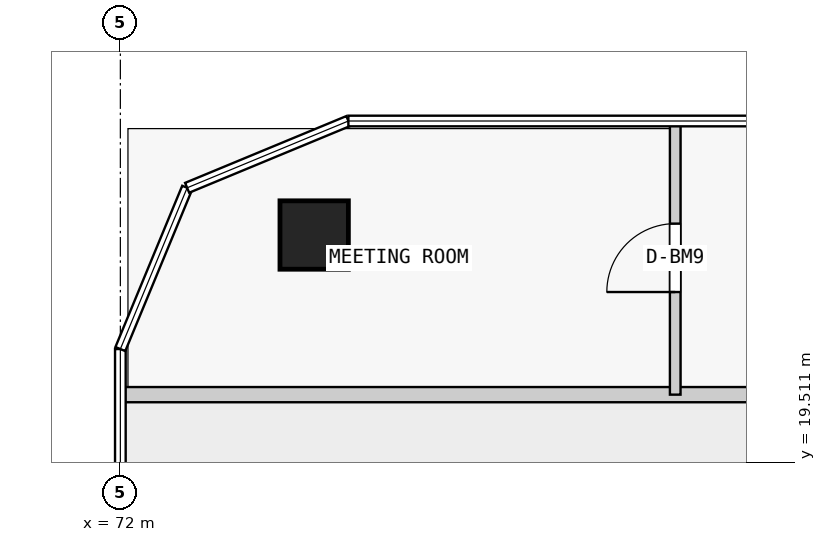
"""IFC4 building model, lengths in metres.
Left out: names, types, materials, properties, quantities, classifications, styles, units other than length and angle.
Written with IfcOpenShell. Run it as: python <this file> out.ifc"""

import sys

from ifc_helpers import new_model, si_unit, direction, frame, frame_2d, origin, origin_2d, place, context, subcontext, project, spatial, rectangle, extrude, element, fill, save


model = new_model("IFC4")
c1 = context("Model", 3, precision=1e-05, world=origin(), true_north=direction((0.0, 1.0)))
c2 = subcontext(c1, "Body", "Model", "MODEL_VIEW")
j1 = project(units=[si_unit("LENGTHUNIT", "METRE"), si_unit("PLANEANGLEUNIT", "RADIAN")], contexts=[c1])
p1 = place(None, origin())
s1 = spatial("IfcSite", under=j1, at=p1, CompositionType="ELEMENT")
p2 = place(p1, origin())
s2 = spatial("IfcBuilding", under=s1, at=p2, CompositionType="ELEMENT")
p3 = place(p2, frame((0.0, 0.0, 113.3)))
s3 = spatial("IfcBuildingStorey", under=s2, at=p3, CompositionType="ELEMENT", Elevation=113.3)
p4 = place(p3, frame((74.55, 22.5, 0.0), z_axis=(0.0, 0.0, 1.0), x_axis=(1.0, 0.0, 0.0)))
e1 = element("IfcColumn", 1, at=p4, inside=s3, PredefinedType="COLUMN", context=c2, shape_type="SweptSolid", body=[
    extrude(rectangle(XDim=0.9, YDim=0.9, at=origin_2d()), origin(), (0.0, 0.0, 1.0), 3.5),
])
p5 = place(p3, frame((72.0, 20.4, 0.0), z_axis=(0.0, 0.0, 1.0), x_axis=(1.0, 0.0, 0.0)))
e2 = element("IfcWall", 2, at=p5, inside=s3, PredefinedType="PARTITIONING", context=c2, shape_type="SweptSolid", body=[
    extrude(rectangle(XDim=20.0, YDim=0.2, at=frame_2d((10.0, 0.0))), origin(), (0.0, 0.0, 1.0), 3.25),
])
p6 = place(p5, frame((11.5, 0.0, 0.0)))
e3 = element("IfcOpeningElement", 3, at=p6, cuts=e2, PredefinedType="OPENING", context=c2, shape_type="SweptSolid", body=[
    extrude(rectangle(XDim=1.0, YDim=2.4, at=frame_2d((0.5, 1.2))), frame((0.0, 0.11, 0.0), z_axis=(0.0, -1.0, 0.0), x_axis=(1.0, 0.0, 0.0)), (0.0, 0.0, 1.0), 0.22),
])
p7 = place(p3, frame((79.3, 20.4, 0.0), z_axis=(0.0, 0.0, 1.0), x_axis=(0.0, 1.0, 0.0)))
e4 = element("IfcWall", 4, at=p7, inside=s3, PredefinedType="PARTITIONING", context=c2, shape_type="SweptSolid", body=[
    extrude(rectangle(XDim=3.6, YDim=0.14, at=frame_2d((1.8, 0.0))), origin(), (0.0, 0.0, 1.0), 3.25),
])
p8 = place(p7, frame((1.35, 0.0, 0.0)))
e5 = element("IfcOpeningElement", 5, at=p8, cuts=e4, PredefinedType="OPENING", context=c2, shape_type="SweptSolid", body=[
    extrude(rectangle(XDim=0.9, YDim=2.4, at=frame_2d((0.45, 1.2))), frame((0.0, 0.08, 0.0), z_axis=(0.0, -1.0, 0.0), x_axis=(1.0, 0.0, 0.0)), (0.0, 0.0, 1.0), 0.16),
])
p9 = place(p8, origin())
e6 = element("IfcDoor", 6, at=p9, inside=s3, OperationType="SINGLE_SWING_LEFT", PredefinedType="DOOR", context=c2, shape_type="SweptSolid", body=[
    extrude(rectangle(XDim=0.9, YDim=2.4, at=frame_2d((0.45, 1.2))), frame((0.0, 0.025, 0.0), z_axis=(0.0, -1.0, 0.0), x_axis=(1.0, 0.0, 0.0)), (0.0, 0.0, 1.0), 0.05),
])
fill(e5, e6)
save(model, sys.argv[1])
